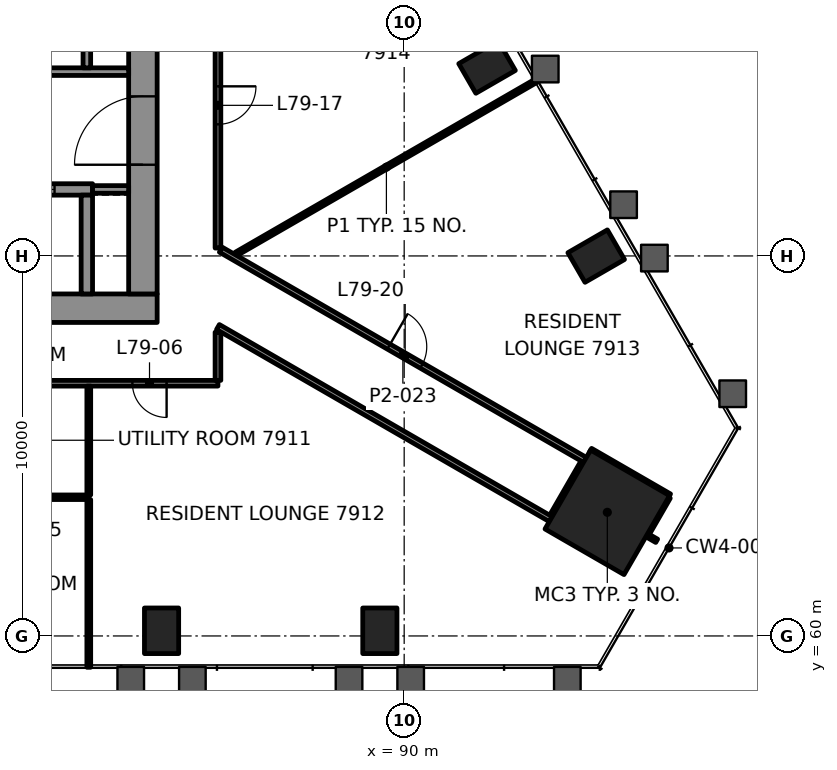
"""IFC4 building model, lengths in metres.
Left out: names, types, materials, properties, quantities, classifications, styles, units other than length and angle.
Written with IfcOpenShell. Run it as: python <this file> out.ifc"""

import sys

from ifc_helpers import new_model, si_unit, direction, frame, frame_2d, origin, origin_2d, place, context, subcontext, project, spatial, rectangle, hollow_rectangle, extrude, element, fill, save


model = new_model("IFC4")
c1 = context("Model", 3, precision=1e-05, world=origin(), true_north=direction((0.0, 1.0)))
c2 = subcontext(c1, "Body", "Model", "MODEL_VIEW")
j1 = project(units=[si_unit("LENGTHUNIT", "METRE"), si_unit("PLANEANGLEUNIT", "RADIAN")], contexts=[c1])
p1 = place(None, origin())
s1 = spatial("IfcSite", under=j1, at=p1, CompositionType="ELEMENT")
p2 = place(p1, origin())
s2 = spatial("IfcBuilding", under=s1, at=p2, CompositionType="ELEMENT")
p3 = place(p2, frame((0.0, 0.0, 323.1)))
s3 = spatial("IfcBuildingStorey", under=s2, at=p3, CompositionType="ELEMENT", Elevation=323.1)
p4 = place(p3, frame((95.345, 63.254, 0.0), z_axis=(0.0, 0.0, 1.0), x_axis=(0.5, 0.866025403784, 0.0)))
e1 = element("IfcColumn", 1, at=p4, inside=s3, PredefinedType="COLUMN", context=c2, shape_type="SweptSolid", body=[
    extrude(rectangle(XDim=2.4, YDim=2.4, at=origin_2d()), origin(), (0.0, 0.0, 1.0), 3.5),
])
for number, where, z_axis, x_axis in (
    (2, (83.616, 60.136, -0.0), (0.0, 0.0, 1.0), (1.0, 0.0, 0.0)),
    (3, (89.36, 60.136, -0.0), (0.0, 0.0, 1.0), (1.0, 0.0, 0.0)),
    (4, (95.052, 69.996, -0.0), (0.0, 0.0, 1.0), (-0.5, 0.866, 0.0)),
    (5, (92.181, 74.97, -0.0), (0.0, 0.0, 1.0), (-0.5, 0.866, 0.0)),
):
    element("IfcColumn", number, at=place(p3, frame(where, z_axis=z_axis, x_axis=x_axis)), inside=s3, PredefinedType="COLUMN", context=c2, shape_type="SweptSolid", body=[
        extrude(hollow_rectangle(XDim=0.9, YDim=1.2, WallThickness=0.06, at=origin_2d()), origin(), (0.0, 0.0, 1.0), 3.5),
    ])
p5 = place(p3, frame((66.5, 68.625, 0.0), z_axis=(0.0, 0.0, 1.0), x_axis=(1.0, 0.0, 0.0)))
e6 = element("IfcWall", 6, at=p5, inside=s3, PredefinedType="SHEAR", context=c2, shape_type="SweptSolid", body=[
    extrude(rectangle(XDim=17.0, YDim=0.75, at=frame_2d((8.5, 0.0))), origin(), (0.0, 0.0, 1.0), 3.2),
])
p6 = place(p5, frame((2.7, 0.0, 0.0)))
e7 = element("IfcOpeningElement", 7, at=p6, cuts=e6, PredefinedType="OPENING", context=c2, shape_type="SweptSolid", body=[
    extrude(rectangle(XDim=0.9, YDim=2.1, at=frame_2d((0.45, 1.05))), frame((0.0, 0.385, 0.0), z_axis=(0.0, -1.0, 0.0), x_axis=(1.0, 0.0, 0.0)), (0.0, 0.0, 1.0), 0.77),
])
p7 = place(p3, frame((83.125, 69.0, 0.0), z_axis=(0.0, 0.0, 1.0), x_axis=(0.0, 1.0, 0.0)))
e8 = element("IfcWall", 8, at=p7, inside=s3, PredefinedType="SHEAR", context=c2, shape_type="SweptSolid", body=[
    extrude(rectangle(XDim=12.0, YDim=0.75, at=frame_2d((6.0, 0.0))), origin(), (0.0, 0.0, 1.0), 3.2),
])
p8 = place(p7, frame((3.4, 0.0, 0.0)))
e9 = element("IfcOpeningElement", 9, at=p8, cuts=e8, PredefinedType="OPENING", context=c2, shape_type="SweptSolid", body=[
    extrude(rectangle(XDim=1.8, YDim=2.1, at=frame_2d((0.9, 1.05))), frame((0.0, 0.385, 0.0), z_axis=(0.0, -1.0, 0.0), x_axis=(1.0, 0.0, 0.0)), (0.0, 0.0, 1.0), 0.77),
])
p9 = place(p3, frame((70.3, 71.75, 0.0), z_axis=(0.0, 0.0, 1.0), x_axis=(1.0, 0.0, 0.0)))
e10 = element("IfcWall", 10, at=p9, inside=s3, PredefinedType="SHEAR", context=c2, shape_type="SweptSolid", body=[
    extrude(rectangle(XDim=11.5, YDim=0.3, at=frame_2d((5.75, 0.0))), origin(), (0.0, 0.0, 1.0), 3.2),
])
p10 = place(p9, frame((1.0, 0.0, 0.0)))
e11 = element("IfcOpeningElement", 11, at=p10, cuts=e10, PredefinedType="OPENING", context=c2, shape_type="SweptSolid", body=[
    extrude(rectangle(XDim=1.1, YDim=2.1, at=frame_2d((0.55, 1.05))), frame((0.0, 0.16, 0.0), z_axis=(0.0, -1.0, 0.0), x_axis=(1.0, 0.0, 0.0)), (0.0, 0.0, 1.0), 0.32),
])
p11 = place(p9, frame((3.8, 0.0, 0.0)))
e12 = element("IfcOpeningElement", 12, at=p11, cuts=e10, PredefinedType="OPENING", context=c2, shape_type="SweptSolid", body=[
    extrude(rectangle(XDim=1.1, YDim=2.1, at=frame_2d((0.55, 1.05))), frame((0.0, 0.16, 0.0), z_axis=(0.0, -1.0, 0.0), x_axis=(1.0, 0.0, 0.0)), (0.0, 0.0, 1.0), 0.32),
])
p12 = place(p9, frame((6.6, 0.0, 0.0)))
e13 = element("IfcOpeningElement", 13, at=p12, cuts=e10, PredefinedType="OPENING", context=c2, shape_type="SweptSolid", body=[
    extrude(rectangle(XDim=1.1, YDim=2.1, at=frame_2d((0.55, 1.05))), frame((0.0, 0.16, 0.0), z_axis=(0.0, -1.0, 0.0), x_axis=(1.0, 0.0, 0.0)), (0.0, 0.0, 1.0), 0.32),
])
p13 = place(p9, frame((9.4, 0.0, 0.0)))
e14 = element("IfcOpeningElement", 14, at=p13, cuts=e10, PredefinedType="OPENING", context=c2, shape_type="SweptSolid", body=[
    extrude(rectangle(XDim=1.1, YDim=2.1, at=frame_2d((0.55, 1.05))), frame((0.0, 0.16, 0.0), z_axis=(0.0, -1.0, 0.0), x_axis=(1.0, 0.0, 0.0)), (0.0, 0.0, 1.0), 0.32),
])
p14 = place(p3, frame((81.65, 69.0, 0.0), z_axis=(0.0, 0.0, 1.0), x_axis=(0.0, 1.0, 0.0)))
e15 = element("IfcWall", 15, at=p14, inside=s3, PredefinedType="SHEAR", context=c2, shape_type="SweptSolid", body=[
    extrude(rectangle(XDim=2.6, YDim=0.3, at=frame_2d((1.3, 0.0))), origin(), (0.0, 0.0, 1.0), 3.2),
])
p15 = place(p3, frame((63.141, 63.65, 0.0), z_axis=(0.0, 0.0, 1.0), x_axis=(1.0, 0.0, 0.0)))
e16 = element("IfcWall", 16, at=p15, inside=s3, PredefinedType="PARTITIONING", context=c2, shape_type="SweptSolid", body=[
    extrude(rectangle(XDim=18.56, YDim=0.12, at=frame_2d((9.28, 0.0))), origin(), (0.0, 0.0, 1.0), 2.6),
])
p16 = place(p15, frame((0.391, 0.0, 0.0)))
e17 = element("IfcOpeningElement", 17, at=p16, cuts=e16, PredefinedType="OPENING", context=c2, shape_type="SweptSolid", body=[
    extrude(rectangle(XDim=0.8, YDim=2.1, at=frame_2d((0.4, 1.05))), frame((0.0, 0.07, 0.0), z_axis=(0.0, -1.0, 0.0), x_axis=(1.0, 0.0, 0.0)), (0.0, 0.0, 1.0), 0.14),
])
p17 = place(p15, frame((1.862, 0.0, 0.0)))
e18 = element("IfcOpeningElement", 18, at=p17, cuts=e16, PredefinedType="OPENING", context=c2, shape_type="SweptSolid", body=[
    extrude(rectangle(XDim=0.9, YDim=2.1, at=frame_2d((0.45, 1.05))), frame((0.0, 0.07, 0.0), z_axis=(0.0, -1.0, 0.0), x_axis=(1.0, 0.0, 0.0)), (0.0, 0.0, 1.0), 0.14),
])
p18 = place(p15, frame((8.768, 0.0, 0.0)))
e19 = element("IfcOpeningElement", 19, at=p18, cuts=e16, PredefinedType="OPENING", context=c2, shape_type="SweptSolid", body=[
    extrude(rectangle(XDim=0.9, YDim=2.1, at=frame_2d((0.45, 1.05))), frame((0.0, 0.07, 0.0), z_axis=(0.0, -1.0, 0.0), x_axis=(1.0, 0.0, 0.0)), (0.0, 0.0, 1.0), 0.14),
])
p19 = place(p15, frame((12.188, 0.0, 0.0)))
e20 = element("IfcOpeningElement", 20, at=p19, cuts=e16, PredefinedType="OPENING", context=c2, shape_type="SweptSolid", body=[
    extrude(rectangle(XDim=0.8, YDim=2.1, at=frame_2d((0.4, 1.05))), frame((0.0, 0.07, 0.0), z_axis=(0.0, -1.0, 0.0), x_axis=(1.0, 0.0, 0.0)), (0.0, 0.0, 1.0), 0.14),
])
p20 = place(p15, frame((16.514, 0.0, 0.0)))
e21 = element("IfcOpeningElement", 21, at=p20, cuts=e16, PredefinedType="OPENING", context=c2, shape_type="SweptSolid", body=[
    extrude(rectangle(XDim=0.9, YDim=2.1, at=frame_2d((0.45, 1.05))), frame((0.0, 0.07, 0.0), z_axis=(0.0, -1.0, 0.0), x_axis=(1.0, 0.0, 0.0)), (0.0, 0.0, 1.0), 0.14),
])
p21 = place(p3, frame((85.099, 66.65, 0.0), z_axis=(0.0, 0.0, 1.0), x_axis=(-1.0, 0.0, 0.0)))
e22 = element("IfcWall", 22, at=p21, inside=s3, PredefinedType="PARTITIONING", context=c2, shape_type="SweptSolid", body=[
    extrude(rectangle(XDim=20.199, YDim=0.15, at=frame_2d((10.1, 0.0))), origin(), (0.0, 0.0, 1.0), 2.6),
])
p22 = place(p21, frame((1.351, 0.0, 0.0)))
e23 = element("IfcOpeningElement", 23, at=p22, cuts=e22, PredefinedType="OPENING", context=c2, shape_type="SweptSolid", body=[
    extrude(rectangle(XDim=0.9, YDim=2.1, at=frame_2d((0.45, 1.05))), frame((0.0, 0.085, 0.0), z_axis=(0.0, -1.0, 0.0), x_axis=(1.0, 0.0, 0.0)), (0.0, 0.0, 1.0), 0.17),
])
p23 = place(p21, frame((14.386, 0.0, 0.0)))
e24 = element("IfcOpeningElement", 24, at=p23, cuts=e22, PredefinedType="OPENING", context=c2, shape_type="SweptSolid", body=[
    extrude(rectangle(XDim=1.0, YDim=2.1, at=frame_2d((0.5, 1.05))), frame((0.0, 0.085, 0.0), z_axis=(0.0, -1.0, 0.0), x_axis=(1.0, 0.0, 0.0)), (0.0, 0.0, 1.0), 0.17),
])
p24 = place(p3, frame((85.574, 70.051, 0.0), z_axis=(0.0, 0.0, 1.0), x_axis=(0.866020575072, 0.500008363482, 0.0)))
e25 = element("IfcWall", 25, at=p24, inside=s3, PredefinedType="PARTITIONING", context=c2, shape_type="SweptSolid", body=[
    extrude(rectangle(XDim=9.141, YDim=0.1, at=frame_2d((4.57, 0.0))), origin(), (0.0, 0.0, 1.0), 2.588),
])
p25 = place(p3, frame((96.384, 62.654, 0.0), z_axis=(0.0, 0.0, 1.0), x_axis=(0.500022773673, 0.866012254999, 0.0)))
e26 = element("IfcWall", 26, at=p25, inside=s3, PredefinedType="PARTITIONING", context=c2, shape_type="SweptSolid", body=[
    extrude(rectangle(XDim=1.149, YDim=0.1, at=frame_2d((0.575, 0.0))), origin(), (0.0, 0.0, 1.0), 2.6),
])
p26 = place(p3, frame((93.893, 63.14, 0.0), z_axis=(0.0, 0.0, 1.0), x_axis=(0.499988108725, 0.866032269107, 0.0)))
e27 = element("IfcWall", 27, at=p26, inside=s3, PredefinedType="PARTITIONING", context=c2, shape_type="SweptSolid", body=[
    extrude(rectangle(XDim=1.644, YDim=0.15, at=frame_2d((0.822, 0.0))), origin(), (0.0, 0.0, 1.0), 2.597),
])
p27 = place(p3, frame((85.1, 66.726, 0.0), z_axis=(0.0, 0.0, 1.0), x_axis=(0.0, 1.0, 0.0)))
e28 = element("IfcWall", 28, at=p27, inside=s3, PredefinedType="PARTITIONING", context=c2, shape_type="SweptSolid", body=[
    extrude(rectangle(XDim=1.267, YDim=0.15, at=frame_2d((0.634, 0.0))), origin(), (0.0, 0.0, 1.0), 2.597),
])
p28 = place(p3, frame((85.1, 83.349, 0.0), z_axis=(0.0, 0.0, 1.0), x_axis=(0.0, -1.0, 0.0)))
e29 = element("IfcWall", 29, at=p28, inside=s3, PredefinedType="PARTITIONING", context=c2, shape_type="SweptSolid", body=[
    extrude(rectangle(XDim=13.141, YDim=0.15, at=frame_2d((6.571, 0.0))), origin(), (0.0, 0.0, 1.0), 2.6),
])
p29 = place(p28, frame((8.886, 0.0, 0.0)))
e30 = element("IfcOpeningElement", 30, at=p29, cuts=e29, PredefinedType="OPENING", context=c2, shape_type="SweptSolid", body=[
    extrude(rectangle(XDim=1.0, YDim=2.1, at=frame_2d((0.5, 1.05))), frame((0.0, 0.085, 0.0), z_axis=(0.0, -1.0, 0.0), x_axis=(1.0, 0.0, 0.0)), (0.0, 0.0, 1.0), 0.17),
])
p30 = place(p3, frame((81.701, 59.176, 0.0), z_axis=(0.0, 0.0, 1.0), x_axis=(0.0, 1.0, 0.0)))
e31 = element("IfcWall", 31, at=p30, inside=s3, PredefinedType="PARTITIONING", context=c2, shape_type="SweptSolid", body=[
    extrude(rectangle(XDim=4.414, YDim=0.1, at=frame_2d((2.207, 0.0))), origin(), (0.0, 0.0, 1.0), 2.588),
])
p31 = place(p3, frame((96.984, 63.693, 0.0), z_axis=(0.0, 0.0, 1.0), x_axis=(-0.866011011868, 0.500024926702, 0.0)))
e32 = element("IfcWall", 32, at=p31, inside=s3, PredefinedType="PARTITIONING", context=c2, shape_type="SweptSolid", body=[
    extrude(rectangle(XDim=2.399, YDim=0.1, at=frame_2d((1.199, 0.0))), origin(), (0.0, 0.0, 1.0), 2.6),
])
p32 = place(p3, frame((85.175, 70.165, 0.0), z_axis=(0.0, 0.0, 1.0), x_axis=(0.866024989193, -0.500000718093, 0.0)))
e33 = element("IfcWall", 33, at=p32, inside=s3, PredefinedType="PARTITIONING", context=c2, shape_type="SweptSolid", body=[
    extrude(rectangle(XDim=11.063, YDim=0.15, at=frame_2d((5.531, 0.0))), origin(), (0.0, 0.0, 1.0), 2.6),
])
p33 = place(p32, frame((5.102, 0.0, 0.0)))
e34 = element("IfcOpeningElement", 34, at=p33, cuts=e33, PredefinedType="OPENING", context=c2, shape_type="SweptSolid", body=[
    extrude(rectangle(XDim=1.0, YDim=2.1, at=frame_2d((0.5, 1.05))), frame((0.0, 0.085, 0.0), z_axis=(0.0, -1.0, 0.0), x_axis=(1.0, 0.0, 0.0)), (0.0, 0.0, 1.0), 0.17),
])
p34 = place(p3, frame((96.644, 62.504, 0.0), z_axis=(0.0, 0.0, 1.0), x_axis=(-0.866071776036, 0.499919672301, 0.0)))
e35 = element("IfcWall", 35, at=p34, inside=s3, PredefinedType="PARTITIONING", context=c2, shape_type="SweptSolid", body=[
    extrude(rectangle(XDim=0.25, YDim=0.1, at=frame_2d((0.125, 0.0))), origin(), (0.0, 0.0, 1.0), 2.6),
])
p35 = place(p3, frame((93.855, 63.075, 0.0), z_axis=(0.0, 0.0, 1.0), x_axis=(-0.866024727794, 0.500001170848, 0.0)))
e36 = element("IfcWall", 36, at=p35, inside=s3, PredefinedType="PARTITIONING", context=c2, shape_type="SweptSolid", body=[
    extrude(rectangle(XDim=10.11, YDim=0.15, at=frame_2d((5.055, 0.0))), origin(), (0.0, 0.0, 1.0), 2.597),
])
p36 = place(p3, frame((81.701, 63.71, 0.0), z_axis=(0.0, 0.0, 1.0), x_axis=(0.0, 1.0, 0.0)))
e37 = element("IfcWall", 37, at=p36, inside=s3, PredefinedType="PARTITIONING", context=c2, shape_type="SweptSolid", body=[
    extrude(rectangle(XDim=2.865, YDim=0.1, at=frame_2d((1.433, 0.0))), origin(), (0.0, 0.0, 1.0), 2.6),
])
p37 = place(p3, frame((81.8, 71.75, 0.0), z_axis=(0.0, 0.0, 1.0), x_axis=(1.0, 0.0, 0.0)))
e38 = element("IfcWall", 38, at=p37, inside=s3, PredefinedType="PARTITIONING", context=c2, shape_type="SweptSolid", body=[
    extrude(rectangle(XDim=0.95, YDim=0.2, at=frame_2d((0.475, 0.0))), origin(), (0.0, 0.0, 1.0), 3.2),
])
p38 = place(p3, frame((76.2, 74.85, 0.0), z_axis=(0.0, 0.0, 1.0), x_axis=(1.0, 0.0, 0.0)))
e39 = element("IfcWall", 39, at=p38, inside=s3, PredefinedType="PARTITIONING", context=c2, shape_type="SweptSolid", body=[
    extrude(rectangle(XDim=6.55, YDim=0.2, at=frame_2d((3.275, 0.0))), origin(), (0.0, 0.0, 1.0), 3.2),
])
p39 = place(p38, frame((0.8, 0.0, 0.0)))
e40 = element("IfcOpeningElement", 40, at=p39, cuts=e39, PredefinedType="OPENING", context=c2, shape_type="SweptSolid", body=[
    extrude(rectangle(XDim=0.9, YDim=2.1, at=frame_2d((0.45, 1.05))), frame((0.0, 0.11, 0.0), z_axis=(0.0, -1.0, 0.0), x_axis=(1.0, 0.0, 0.0)), (0.0, 0.0, 1.0), 0.22),
])
p40 = place(p38, frame((3.6, 0.0, 0.0)))
e41 = element("IfcOpeningElement", 41, at=p40, cuts=e39, PredefinedType="OPENING", context=c2, shape_type="SweptSolid", body=[
    extrude(rectangle(XDim=0.9, YDim=2.1, at=frame_2d((0.45, 1.05))), frame((0.0, 0.11, 0.0), z_axis=(0.0, -1.0, 0.0), x_axis=(1.0, 0.0, 0.0)), (0.0, 0.0, 1.0), 0.22),
])
p41 = place(p3, frame((81.65, 74.95, 0.0), z_axis=(0.0, 0.0, 1.0), x_axis=(0.0, 1.0, 0.0)))
e42 = element("IfcWall", 42, at=p41, inside=s3, PredefinedType="PARTITIONING", context=c2, shape_type="SweptSolid", body=[
    extrude(rectangle(XDim=2.65, YDim=0.2, at=frame_2d((1.325, 0.0))), origin(), (0.0, 0.0, 1.0), 3.2),
])
p42 = place(p22, origin())
e43 = element("IfcDoor", 43, at=p42, inside=s3, OperationType="SINGLE_SWING_RIGHT", PredefinedType="DOOR", context=c2, shape_type="SweptSolid", body=[
    extrude(rectangle(XDim=0.9, YDim=2.1, at=frame_2d((0.45, 1.05))), frame((0.0, 0.025, 0.0), z_axis=(0.0, -1.0, 0.0), x_axis=(1.0, 0.0, 0.0)), (0.0, 0.0, 1.0), 0.05),
])
fill(e23, e43)
p43 = place(p29, origin())
e44 = element("IfcDoor", 44, at=p43, inside=s3, OperationType="SINGLE_SWING_RIGHT", PredefinedType="DOOR", context=c2, shape_type="SweptSolid", body=[
    extrude(rectangle(XDim=1.0, YDim=2.1, at=frame_2d((0.5, 1.05))), frame((0.0, 0.025, 0.0), z_axis=(0.0, -1.0, 0.0), x_axis=(1.0, 0.0, 0.0)), (0.0, 0.0, 1.0), 0.05),
])
fill(e30, e44)
p44 = place(p33, origin())
e45 = element("IfcDoor", 45, at=p44, inside=s3, OperationType="SINGLE_SWING_LEFT", PredefinedType="DOOR", context=c2, shape_type="SweptSolid", body=[
    extrude(rectangle(XDim=1.0, YDim=2.1, at=frame_2d((0.5, 1.05))), frame((0.0, 0.025, 0.0), z_axis=(0.0, -1.0, 0.0), x_axis=(1.0, 0.0, 0.0)), (0.0, 0.0, 1.0), 0.05),
])
fill(e34, e45)
p45 = place(p13, origin())
e46 = element("IfcDoor", 46, at=p45, inside=s3, OperationType="DOUBLE_DOOR_SLIDING", PredefinedType="DOOR", context=c2, shape_type="SweptSolid", body=[
    extrude(rectangle(XDim=1.1, YDim=2.1, at=frame_2d((0.55, 1.05))), frame((0.0, 0.025, 0.0), z_axis=(0.0, -1.0, 0.0), x_axis=(1.0, 0.0, 0.0)), (0.0, 0.0, 1.0), 0.05),
])
fill(e14, e46)
p46 = place(p8, origin())
e47 = element("IfcDoor", 47, at=p46, inside=s3, OperationType="SINGLE_SWING_LEFT", PredefinedType="DOOR", context=c2, shape_type="SweptSolid", body=[
    extrude(rectangle(XDim=1.8, YDim=2.1, at=frame_2d((0.9, 1.05))), frame((0.0, 0.095, 0.0), z_axis=(0.0, -1.0, 0.0), x_axis=(1.0, 0.0, 0.0)), (0.0, 0.0, 1.0), 0.19),
])
fill(e9, e47)
save(model, sys.argv[1])
